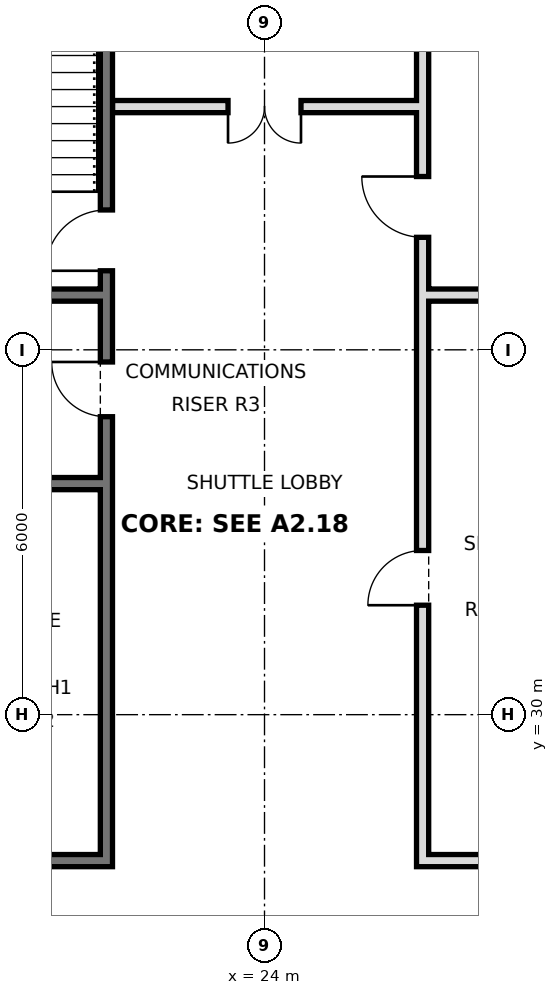
"""IFC4 building model, lengths in metres.
Left out: names, types, materials, properties, quantities, classifications, styles, units other than length and angle.
Written with IfcOpenShell. Run it as: python <this file> out.ifc"""

import sys

from ifc_helpers import new_model, si_unit, direction, frame, frame_2d, origin, place, context, subcontext, project, spatial, rectangle, extrude, element, fill, save


model = new_model("IFC4")
c1 = context("Model", 3, precision=1e-05, world=origin(), true_north=direction((0.0, 1.0)))
c2 = subcontext(c1, "Body", "Model", "MODEL_VIEW")
j1 = project(units=[si_unit("LENGTHUNIT", "METRE"), si_unit("PLANEANGLEUNIT", "RADIAN")], contexts=[c1])
p1 = place(None, origin())
s1 = spatial("IfcSite", under=j1, at=p1, CompositionType="ELEMENT")
p2 = place(p1, origin())
s2 = spatial("IfcBuilding", under=s1, at=p2, CompositionType="ELEMENT")
p3 = place(p2, frame((0.0, 0.0, 71.4)))
s3 = spatial("IfcBuildingStorey", under=s2, at=p3, CompositionType="ELEMENT", Elevation=71.4)
p4 = place(p3, frame((21.4, 27.5, 0.0), z_axis=(0.0, 0.0, 1.0), x_axis=(0.0, 1.0, 0.0)))
e1 = element("IfcWall", 1, at=p4, inside=s3, PredefinedType="SOLIDWALL", context=c2, shape_type="SweptSolid", body=[
    extrude(rectangle(XDim=17.5, YDim=0.2, at=frame_2d((8.75, 0.0))), origin(), (0.0, 0.0, 1.0), 3.42),
])
p5 = place(p4, frame((9.8, 0.0, 0.0)))
e2 = element("IfcOpeningElement", 2, at=p5, cuts=e1, PredefinedType="OPENING", context=c2, shape_type="SweptSolid", body=[
    extrude(rectangle(XDim=1.0, YDim=2.1, at=frame_2d((0.5, 1.05))), frame((0.0, 0.11, 0.0), z_axis=(0.0, -1.0, 0.0), x_axis=(1.0, 0.0, 0.0)), (0.0, 0.0, 1.0), 0.22),
])
p6 = place(p4, frame((7.4, 0.0, 0.0)))
e3 = element("IfcOpeningElement", 3, at=p6, cuts=e1, PredefinedType="OPENING", context=c2, shape_type="SweptSolid", body=[
    extrude(rectangle(XDim=0.9, YDim=2.1, at=frame_2d((0.45, 1.05))), frame((0.0, 0.11, 0.0), z_axis=(0.0, -1.0, 0.0), x_axis=(1.0, 0.0, 0.0)), (0.0, 0.0, 1.0), 0.22),
])
p7 = place(p3, frame((26.6, 27.5, 0.0), z_axis=(0.0, 0.0, 1.0), x_axis=(0.0, 1.0, 0.0)))
e4 = element("IfcWall", 4, at=p7, inside=s3, PredefinedType="SOLIDWALL", context=c2, shape_type="SweptSolid", body=[
    extrude(rectangle(XDim=17.5, YDim=0.2, at=frame_2d((8.75, 0.0))), origin(), (0.0, 0.0, 1.0), 3.42),
])
p8 = place(p7, frame((4.3, 0.0, 0.0)))
e5 = element("IfcOpeningElement", 5, at=p8, cuts=e4, PredefinedType="OPENING", context=c2, shape_type="SweptSolid", body=[
    extrude(rectangle(XDim=0.9, YDim=2.1, at=frame_2d((0.45, 1.05))), frame((0.0, 0.11, 0.0), z_axis=(0.0, -1.0, 0.0), x_axis=(1.0, 0.0, 0.0)), (0.0, 0.0, 1.0), 0.22),
])
p9 = place(p7, frame((10.35, 0.0, 0.0)))
e6 = element("IfcOpeningElement", 6, at=p9, cuts=e4, PredefinedType="OPENING", context=c2, shape_type="SweptSolid", body=[
    extrude(rectangle(XDim=1.0, YDim=2.1, at=frame_2d((0.5, 1.05))), frame((0.0, 0.11, 0.0), z_axis=(0.0, -1.0, 0.0), x_axis=(1.0, 0.0, 0.0)), (0.0, 0.0, 1.0), 0.22),
])
for number, where, z_axis, x_axis in (
    (7, (18.6, 27.6, 0.0), (0.0, 0.0, 1.0), (1.0, 0.0, 0.0)),
    (8, (26.7, 27.6, 0.0), (0.0, 0.0, 1.0), (1.0, 0.0, 0.0)),
    (9, (18.6, 33.8, 0.0), (0.0, 0.0, 1.0), (1.0, 0.0, 0.0)),
    (10, (18.6, 36.9, 0.0), (0.0, 0.0, 1.0), (1.0, 0.0, 0.0)),
    (11, (26.7, 36.9, 0.0), (0.0, 0.0, 1.0), (1.0, 0.0, 0.0)),
):
    element("IfcWall", number, at=place(p3, frame(where, z_axis=z_axis, x_axis=x_axis)), inside=s3, PredefinedType="SOLIDWALL", context=c2, shape_type="SweptSolid", body=[
        extrude(rectangle(XDim=2.7, YDim=0.2, at=frame_2d((1.35, 0.0))), origin(), (0.0, 0.0, 1.0), 3.42),
    ])
p10 = place(p3, frame((21.5, 40.0, 0.0), z_axis=(0.0, 0.0, 1.0), x_axis=(1.0, 0.0, 0.0)))
e12 = element("IfcWall", 12, at=p10, inside=s3, PredefinedType="PARTITIONING", context=c2, shape_type="SweptSolid", body=[
    extrude(rectangle(XDim=5.0, YDim=0.2, at=frame_2d((2.5, 0.0))), origin(), (0.0, 0.0, 1.0), 3.42),
])
p11 = place(p10, frame((1.9, 0.0, 0.0)))
e13 = element("IfcOpeningElement", 13, at=p11, cuts=e12, PredefinedType="OPENING", context=c2, shape_type="SweptSolid", body=[
    extrude(rectangle(XDim=1.2, YDim=2.1, at=frame_2d((0.6, 1.05))), frame((0.0, 0.11, 0.0), z_axis=(0.0, -1.0, 0.0), x_axis=(1.0, 0.0, 0.0)), (0.0, 0.0, 1.0), 0.22),
])
p12 = place(p11, frame((1.2, 0.0, 0.0), z_axis=(0.0, 0.0, 1.0), x_axis=(-1.0, 0.0, 0.0)))
e14 = element("IfcDoor", 14, at=p12, inside=s3, OperationType="DOUBLE_DOOR_SINGLE_SWING", PredefinedType="DOOR", context=c2, shape_type="SweptSolid", body=[
    extrude(rectangle(XDim=1.2, YDim=2.1, at=frame_2d((0.6, 1.05))), frame((0.0, 0.025, 0.0), z_axis=(0.0, -1.0, 0.0), x_axis=(1.0, 0.0, 0.0)), (0.0, 0.0, 1.0), 0.05),
])
fill(e13, e14)
p13 = place(p5, origin())
e15 = element("IfcDoor", 15, at=p13, inside=s3, OperationType="SINGLE_SWING_LEFT", PredefinedType="DOOR", context=c2, shape_type="SweptSolid", body=[
    extrude(rectangle(XDim=1.0, YDim=2.1, at=frame_2d((0.5, 1.05))), frame((0.0, 0.025, 0.0), z_axis=(0.0, -1.0, 0.0), x_axis=(1.0, 0.0, 0.0)), (0.0, 0.0, 1.0), 0.05),
])
fill(e2, e15)
p14 = place(p6, frame((0.9, 0.0, 0.0), z_axis=(0.0, 0.0, 1.0), x_axis=(-1.0, 0.0, 0.0)))
e16 = element("IfcDoor", 16, at=p14, inside=s3, OperationType="SINGLE_SWING_LEFT", PredefinedType="DOOR", context=c2, shape_type="SweptSolid", body=[
    extrude(rectangle(XDim=0.9, YDim=2.1, at=frame_2d((0.45, 1.05))), frame((0.0, 0.025, 0.0), z_axis=(0.0, -1.0, 0.0), x_axis=(1.0, 0.0, 0.0)), (0.0, 0.0, 1.0), 0.05),
])
fill(e3, e16)
p15 = place(p8, origin())
e17 = element("IfcDoor", 17, at=p15, inside=s3, OperationType="SINGLE_SWING_LEFT", PredefinedType="DOOR", context=c2, shape_type="SweptSolid", body=[
    extrude(rectangle(XDim=0.9, YDim=2.1, at=frame_2d((0.45, 1.05))), frame((0.0, 0.025, 0.0), z_axis=(0.0, -1.0, 0.0), x_axis=(1.0, 0.0, 0.0)), (0.0, 0.0, 1.0), 0.05),
])
fill(e5, e17)
p16 = place(p9, frame((1.0, 0.0, 0.0), z_axis=(0.0, 0.0, 1.0), x_axis=(-1.0, 0.0, 0.0)))
e18 = element("IfcDoor", 18, at=p16, inside=s3, OperationType="SINGLE_SWING_LEFT", PredefinedType="DOOR", context=c2, shape_type="SweptSolid", body=[
    extrude(rectangle(XDim=1.0, YDim=2.1, at=frame_2d((0.5, 1.05))), frame((0.0, 0.025, 0.0), z_axis=(0.0, -1.0, 0.0), x_axis=(1.0, 0.0, 0.0)), (0.0, 0.0, 1.0), 0.05),
])
fill(e6, e18)
save(model, sys.argv[1])
